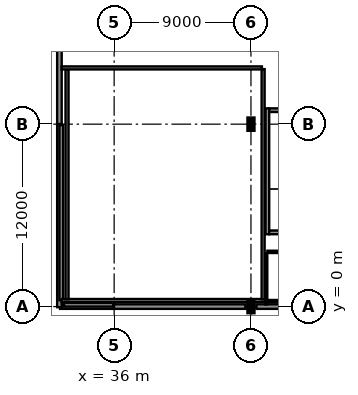
"""IFC4 building model, lengths in metres.
Left out: names, types, materials, properties, quantities, classifications, styles, units other than length and angle.
Written with IfcOpenShell. Run it as: python <this file> out.ifc"""

import sys

from ifc_helpers import new_model, si_unit, direction, frame, frame_2d, origin, origin_2d, place, context, subcontext, project, spatial, rectangle, i_section, extrude, element, fill, save


model = new_model("IFC4")
c1 = context("Model", 3, precision=1e-05, world=origin(), true_north=direction((0.0, 1.0)))
c2 = subcontext(c1, "Body", "Model", "MODEL_VIEW")
j1 = project(units=[si_unit("LENGTHUNIT", "METRE"), si_unit("PLANEANGLEUNIT", "RADIAN")], contexts=[c1])
p1 = place(None, origin())
s1 = spatial("IfcSite", under=j1, at=p1, CompositionType="ELEMENT")
p2 = place(p1, origin())
s2 = spatial("IfcBuilding", under=s1, at=p2, CompositionType="ELEMENT")
p3 = place(p2, frame((0.0, 0.0, 9.9)))
s3 = spatial("IfcBuildingStorey", under=s2, at=p3, CompositionType="ELEMENT", Elevation=9.9)
for number, where, z_axis, x_axis in (
    (1, (45.0, 0.0, 0.0), (0.0, 0.0, 1.0), (0.0, 1.0, 0.0)),
    (2, (45.0, 12.0, 0.0), (0.0, 0.0, 1.0), (1.0, 0.0, 0.0)),
):
    element("IfcColumn", number, at=place(p3, frame(where, z_axis=z_axis, x_axis=x_axis)), inside=s3, PredefinedType="COLUMN", context=c2, shape_type="SweptSolid", body=[
        extrude(i_section(OverallWidth=0.304, OverallDepth=0.716, WebThickness=0.021, FlangeThickness=0.04, at=origin_2d()), origin(), (0.0, 0.0, 1.0), 4.5),
    ])
p4 = place(p3, frame((32.44, 0.0, 0.0), z_axis=(0.0, 0.0, 1.0), x_axis=(1.0, 0.0, 0.0)))
e3 = element("IfcWall", 3, at=p4, inside=s3, PredefinedType="SOLIDWALL", context=c2, shape_type="SweptSolid", body=[
    extrude(rectangle(XDim=3.57, YDim=0.3, at=frame_2d((1.785, 0.0))), origin(), (0.0, 0.0, 1.0), 3.147),
])
p5 = place(p3, frame((35.99, 0.0, 0.0), z_axis=(0.0, 0.0, 1.0), x_axis=(1.0, 0.0, 0.0)))
e4 = element("IfcWall", 4, at=p5, inside=s3, PredefinedType="SOLIDWALL", context=c2, shape_type="SweptSolid", body=[
    extrude(rectangle(XDim=8.654, YDim=0.3, at=frame_2d((4.327, 0.0))), origin(), (0.0, 0.0, 1.0), 3.147),
])
p6 = place(p3, frame((45.356, 0.0, 0.0), z_axis=(0.0, 0.0, 1.0), x_axis=(1.0, 0.0, 0.0)))
e5 = element("IfcWall", 5, at=p6, inside=s3, PredefinedType="SOLIDWALL", context=c2, shape_type="SweptSolid", body=[
    extrude(rectangle(XDim=8.636, YDim=0.3, at=frame_2d((4.318, 0.0))), origin(), (0.0, 0.0, 1.0), 3.147),
])
p7 = place(p6, frame((1.941, 0.0, 0.9)))
e6 = element("IfcOpeningElement", 6, at=p7, cuts=e5, PredefinedType="OPENING", context=c2, shape_type="SweptSolid", body=[
    extrude(rectangle(XDim=1.3, YDim=1.3, at=frame_2d((0.65, 0.65))), frame((0.0, 0.165, 0.0), z_axis=(0.0, -1.0, 0.0), x_axis=(1.0, 0.0, 0.0)), (0.0, 0.0, 1.0), 0.33),
])
p8 = place(p6, frame((5.395, 0.0, 0.9)))
e7 = element("IfcOpeningElement", 7, at=p8, cuts=e5, PredefinedType="OPENING", context=c2, shape_type="SweptSolid", body=[
    extrude(rectangle(XDim=1.3, YDim=1.3, at=frame_2d((0.65, 0.65))), frame((0.0, 0.165, 0.0), z_axis=(0.0, -1.0, 0.0), x_axis=(1.0, 0.0, 0.0)), (0.0, 0.0, 1.0), 0.33),
])
p9 = place(p3, frame((32.4, 23.96, 0.0), z_axis=(0.0, 0.0, 1.0), x_axis=(0.0, -1.0, 0.0)))
e8 = element("IfcWall", 8, at=p9, inside=s3, PredefinedType="SOLIDWALL", context=c2, shape_type="SweptSolid", body=[
    extrude(rectangle(XDim=11.97, YDim=0.3, at=frame_2d((5.985, 0.0))), origin(), (0.0, 0.0, 1.0), 3.455),
])
p10 = place(p9, frame((2.941, 0.0, 0.9)))
e9 = element("IfcOpeningElement", 9, at=p10, cuts=e8, PredefinedType="OPENING", context=c2, shape_type="SweptSolid", body=[
    extrude(rectangle(XDim=1.3, YDim=1.3, at=frame_2d((0.65, 0.65))), frame((0.0, 0.165, 0.0), z_axis=(0.0, -1.0, 0.0), x_axis=(1.0, 0.0, 0.0)), (0.0, 0.0, 1.0), 0.33),
])
p11 = place(p9, frame((8.5, 0.0, 0.9)))
e10 = element("IfcOpeningElement", 10, at=p11, cuts=e8, PredefinedType="OPENING", context=c2, shape_type="SweptSolid", body=[
    extrude(rectangle(XDim=1.3, YDim=1.3, at=frame_2d((0.65, 0.65))), frame((0.0, 0.165, 0.0), z_axis=(0.0, -1.0, 0.0), x_axis=(1.0, 0.0, 0.0)), (0.0, 0.0, 1.0), 0.33),
])
p12 = place(p3, frame((32.4, 12.01, 0.0), z_axis=(0.0, 0.0, 1.0), x_axis=(0.0, -1.0, 0.0)))
e11 = element("IfcWall", 11, at=p12, inside=s3, PredefinedType="SOLIDWALL", context=c2, shape_type="SweptSolid", body=[
    extrude(rectangle(XDim=12.05, YDim=0.3, at=frame_2d((6.025, 0.0))), origin(), (0.0, 0.0, 1.0), 3.455),
])
p13 = place(p12, frame((2.965, 0.0, 0.9)))
e12 = element("IfcOpeningElement", 12, at=p13, cuts=e11, PredefinedType="OPENING", context=c2, shape_type="SweptSolid", body=[
    extrude(rectangle(XDim=1.3, YDim=1.3, at=frame_2d((0.65, 0.65))), frame((0.0, 0.165, 0.0), z_axis=(0.0, -1.0, 0.0), x_axis=(1.0, 0.0, 0.0)), (0.0, 0.0, 1.0), 0.33),
])
p14 = place(p12, frame((7.785, 0.0, 0.9)))
e13 = element("IfcOpeningElement", 13, at=p14, cuts=e11, PredefinedType="OPENING", context=c2, shape_type="SweptSolid", body=[
    extrude(rectangle(XDim=1.3, YDim=1.3, at=frame_2d((0.65, 0.65))), frame((0.0, 0.165, 0.0), z_axis=(0.0, -1.0, 0.0), x_axis=(1.0, 0.0, 0.0)), (0.0, 0.0, 1.0), 0.33),
])
p15 = place(p3, frame((32.7, 0.12, 4.28), z_axis=(0.0, 0.0, 1.0), x_axis=(1.0, 0.0, 0.0)))
e14 = element("IfcWall", 14, at=p15, inside=s3, PredefinedType="PARAPET", context=c2, shape_type="SweptSolid", body=[
    extrude(rectangle(XDim=3.24, YDim=0.24, at=frame_2d((1.62, 0.0))), origin(), (0.0, 0.0, 1.0), 0.77),
])
p16 = place(p3, frame((32.52, 0.42, 4.28), z_axis=(0.0, 0.0, 1.0), x_axis=(0.0, 1.0, 0.0)))
e15 = element("IfcWall", 15, at=p16, inside=s3, PredefinedType="PARAPET", context=c2, shape_type="SweptSolid", body=[
    extrude(rectangle(XDim=11.52, YDim=0.24, at=frame_2d((5.76, 0.0))), origin(), (0.0, 0.0, 1.0), 0.77),
])
p17 = place(p3, frame((46.08, 4.76, 0.0), z_axis=(0.0, 0.0, 1.0), x_axis=(0.0, 1.0, 0.0)))
e16 = element("IfcWall", 16, at=p17, inside=s3, PredefinedType="SHEAR", context=c2, shape_type="SweptSolid", body=[
    extrude(rectangle(XDim=8.28, YDim=0.24, at=frame_2d((4.14, 0.0))), origin(), (0.0, 0.0, 1.0), 4.31),
])
for number, where, z_axis, x_axis in (
    (17, (46.2, 4.88, 0.0), (0.0, 0.0, 1.0), (1.0, 0.0, 0.0)),
    (18, (46.2, 12.92, 0.0), (0.0, 0.0, 1.0), (1.0, 0.0, 0.0)),
):
    element("IfcWall", number, at=place(p3, frame(where, z_axis=z_axis, x_axis=x_axis)), inside=s3, PredefinedType="SHEAR", context=c2, shape_type="SweptSolid", body=[
        extrude(rectangle(XDim=3.7, YDim=0.24, at=frame_2d((1.85, 0.0))), origin(), (0.0, 0.0, 1.0), 4.31),
    ])
p18 = place(p3, frame((71.92, 0.36, 0.0), z_axis=(0.0, 0.0, 1.0), x_axis=(-1.0, 0.0, 0.0)))
e19 = element("IfcWall", 19, at=p18, inside=s3, PredefinedType="PARTITIONING", context=c2, shape_type="SweptSolid", body=[
    extrude(rectangle(XDim=25.84, YDim=0.15, at=frame_2d((12.92, 0.0))), origin(), (0.0, 0.0, 1.0), 4.14),
])
p19 = place(p3, frame((46.0, 0.145, 0.0), z_axis=(0.0, 0.0, 1.0), x_axis=(0.0, 1.0, 0.0)))
e20 = element("IfcWall", 20, at=p19, inside=s3, PredefinedType="PARTITIONING", context=c2, shape_type="SweptSolid", body=[
    extrude(rectangle(XDim=3.375, YDim=0.15, at=frame_2d((1.688, 0.0))), origin(), (0.0, 0.0, 1.0), 4.14),
])
p20 = place(p3, frame((46.08, 3.6, 0.0), z_axis=(0.0, 0.0, 1.0), x_axis=(1.0, 0.0, 0.0)))
e21 = element("IfcWall", 21, at=p20, inside=s3, PredefinedType="PARTITIONING", context=c2, shape_type="SweptSolid", body=[
    extrude(rectangle(XDim=71.04, YDim=0.15, at=frame_2d((35.52, 0.0))), origin(), (0.0, 0.0, 1.0), 4.14),
])
p21 = place(p20, frame((27.595, 0.0, 0.0)))
e22 = element("IfcOpeningElement", 22, at=p21, cuts=e21, PredefinedType="OPENING", context=c2, shape_type="SweptSolid", body=[
    extrude(rectangle(XDim=1.05, YDim=2.25, at=frame_2d((0.525, 1.125))), frame((0.0, 0.09, 0.0), z_axis=(0.0, -1.0, 0.0), x_axis=(1.0, 0.0, 0.0)), (0.0, 0.0, 1.0), 0.18),
])
p22 = place(p3, frame((45.93, 0.4, 0.0), z_axis=(0.0, 0.0, 1.0), x_axis=(-1.0, 0.0, 0.0)))
e23 = element("IfcWall", 23, at=p22, inside=s3, PredefinedType="PARTITIONING", context=c2, shape_type="SweptSolid", body=[
    extrude(rectangle(XDim=13.385, YDim=0.2, at=frame_2d((6.692, 0.0))), origin(), (0.0, 0.0, 1.0), 4.14),
])
p23 = place(p3, frame((32.9, 0.48, 0.0), z_axis=(0.0, 0.0, 1.0), x_axis=(0.0, 1.0, 0.0)))
e24 = element("IfcWall", 24, at=p23, inside=s3, PredefinedType="PARTITIONING", context=c2, shape_type="SweptSolid", body=[
    extrude(rectangle(XDim=15.14, YDim=0.2, at=frame_2d((7.57, 0.0))), origin(), (0.0, 0.0, 1.0), 4.14),
])
p24 = place(p3, frame((32.545, 15.7, 0.0), z_axis=(0.0, 0.0, 1.0), x_axis=(1.0, 0.0, 0.0)))
e25 = element("IfcWall", 25, at=p24, inside=s3, PredefinedType="PARTITIONING", context=c2, shape_type="SweptSolid", body=[
    extrude(rectangle(XDim=13.175, YDim=0.2, at=frame_2d((6.587, 0.0))), origin(), (0.0, 0.0, 1.0), 4.14),
])
p25 = place(p24, frame((5.587, 0.0, 0.0)))
e26 = element("IfcOpeningElement", 26, at=p25, cuts=e25, PredefinedType="OPENING", context=c2, shape_type="SweptSolid", body=[
    extrude(rectangle(XDim=2.0, YDim=2.6, at=frame_2d((1.0, 1.3))), frame((0.0, 0.115, 0.0), z_axis=(0.0, -1.0, 0.0), x_axis=(1.0, 0.0, 0.0)), (0.0, 0.0, 1.0), 0.23),
])
p26 = place(p3, frame((45.8, 15.62, 0.0), z_axis=(0.0, 0.0, 1.0), x_axis=(0.0, -1.0, 0.0)))
e27 = element("IfcWall", 27, at=p26, inside=s3, PredefinedType="PARTITIONING", context=c2, shape_type="SweptSolid", body=[
    extrude(rectangle(XDim=15.14, YDim=0.2, at=frame_2d((7.57, 0.0))), origin(), (0.0, 0.0, 1.0), 4.14),
])
p27 = place(p11, origin())
e28 = element("IfcWindow", 28, at=p27, inside=s3, PartitioningType="SINGLE_PANEL", PredefinedType="WINDOW", context=c2, shape_type="SweptSolid", body=[
    extrude(rectangle(XDim=1.3, YDim=1.3, at=frame_2d((0.65, 0.65))), frame((0.0, 0.03, 0.0), z_axis=(0.0, -1.0, 0.0), x_axis=(1.0, 0.0, 0.0)), (0.0, 0.0, 1.0), 0.06),
])
fill(e10, e28)
p28 = place(p13, origin())
e29 = element("IfcWindow", 29, at=p28, inside=s3, PartitioningType="SINGLE_PANEL", PredefinedType="WINDOW", context=c2, shape_type="SweptSolid", body=[
    extrude(rectangle(XDim=1.3, YDim=1.3, at=frame_2d((0.65, 0.65))), frame((0.0, 0.03, 0.0), z_axis=(0.0, -1.0, 0.0), x_axis=(1.0, 0.0, 0.0)), (0.0, 0.0, 1.0), 0.06),
])
fill(e12, e29)
p29 = place(p14, origin())
e30 = element("IfcWindow", 30, at=p29, inside=s3, PartitioningType="SINGLE_PANEL", PredefinedType="WINDOW", context=c2, shape_type="SweptSolid", body=[
    extrude(rectangle(XDim=1.3, YDim=1.3, at=frame_2d((0.65, 0.65))), frame((0.0, 0.03, 0.0), z_axis=(0.0, -1.0, 0.0), x_axis=(1.0, 0.0, 0.0)), (0.0, 0.0, 1.0), 0.06),
])
fill(e13, e30)
p30 = place(p25, origin())
e31 = element("IfcDoor", 31, at=p30, inside=s3, OperationType="DOUBLE_DOOR_SINGLE_SWING", PredefinedType="DOOR", context=c2, shape_type="SweptSolid", body=[
    extrude(rectangle(XDim=2.0, YDim=2.6, at=frame_2d((1.0, 1.3))), frame((0.0, 0.025, 0.0), z_axis=(0.0, -1.0, 0.0), x_axis=(1.0, 0.0, 0.0)), (0.0, 0.0, 1.0), 0.05),
])
fill(e26, e31)
save(model, sys.argv[1])
